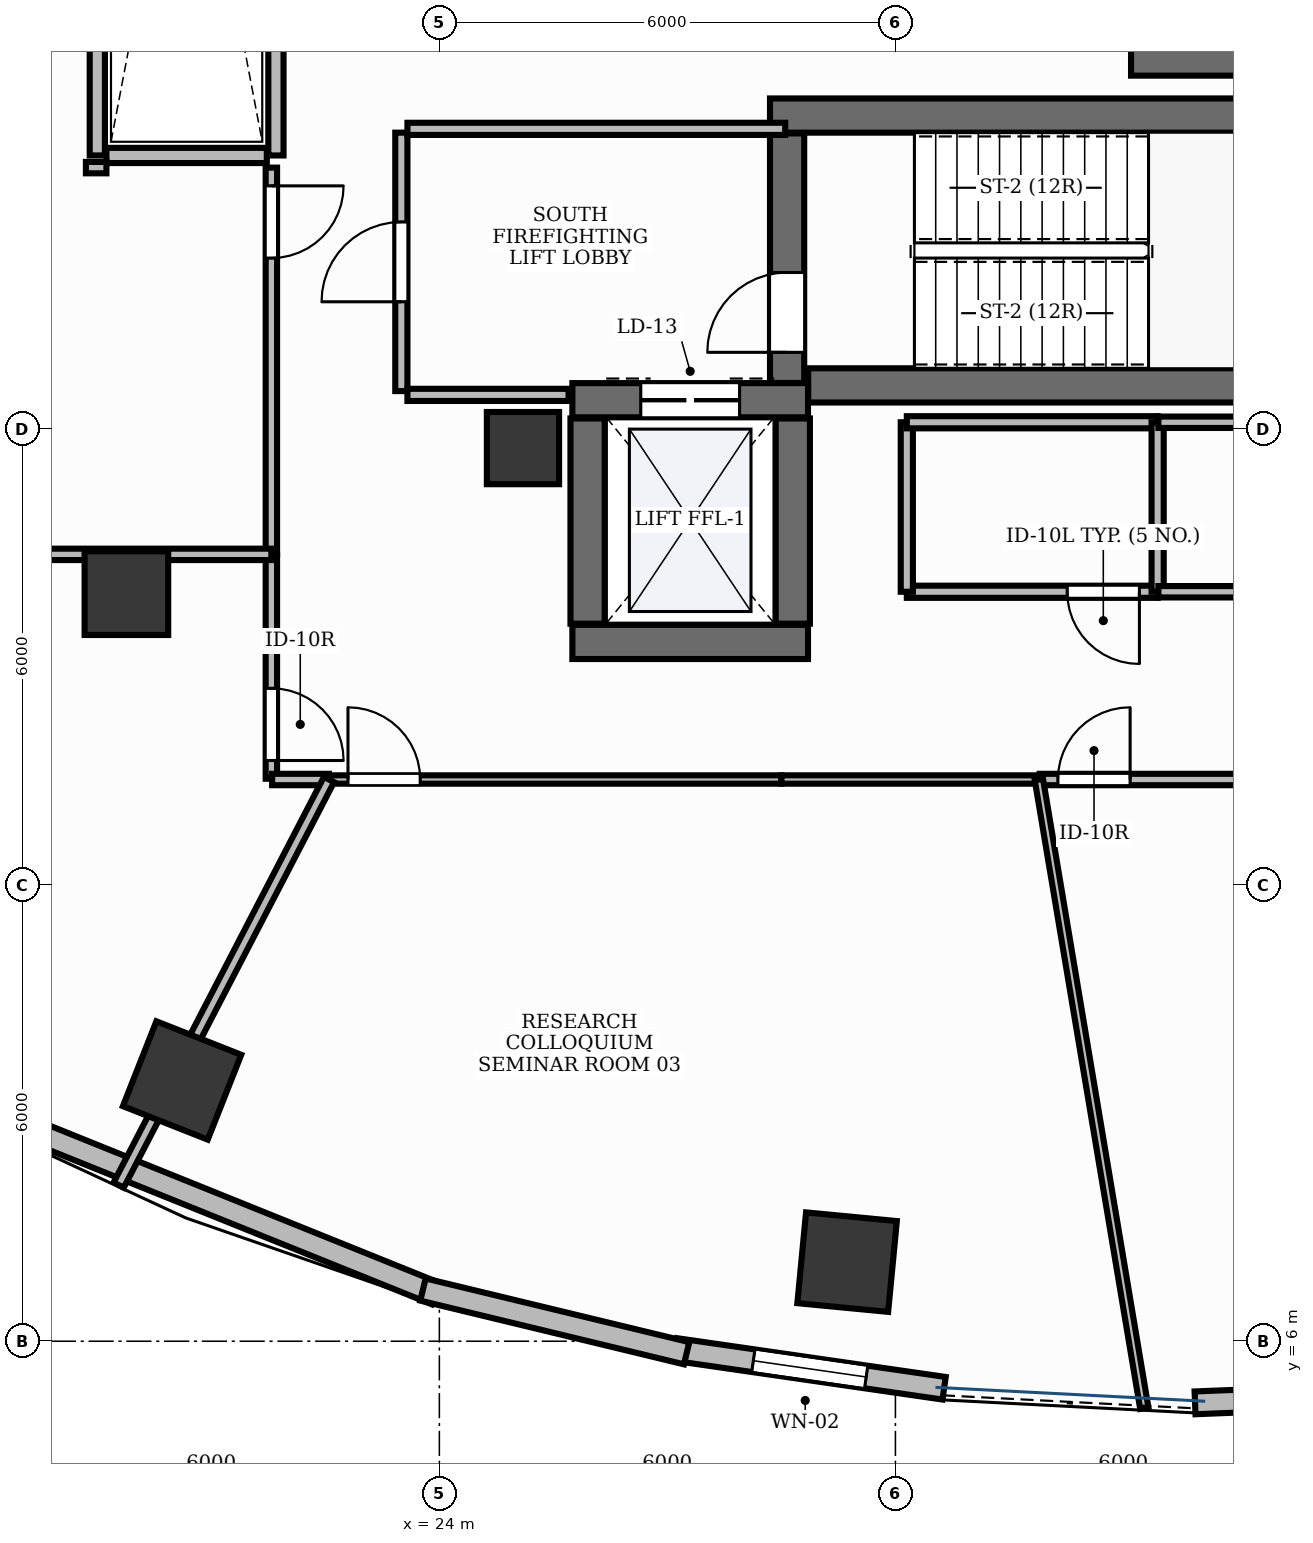
"""IFC4 building model, lengths in metres.
Left out: names, types, materials, properties, quantities, classifications, styles, units other than length and angle.
Written with IfcOpenShell. Run it as: python <this file> out.ifc"""

import sys

from ifc_helpers import new_model, si_unit, direction, frame, frame_2d, origin, origin_2d, place, context, subcontext, project, spatial, rectangle, extrude, element, fill, save


model = new_model("IFC4")
c1 = context("Model", 3, precision=1e-05, world=origin(), true_north=direction((0.0, 1.0)))
c2 = subcontext(c1, "Body", "Model", "MODEL_VIEW")
j1 = project(units=[si_unit("LENGTHUNIT", "METRE"), si_unit("PLANEANGLEUNIT", "RADIAN")], contexts=[c1])
p1 = place(None, origin())
s1 = spatial("IfcSite", under=j1, at=p1, CompositionType="ELEMENT")
p2 = place(p1, origin())
s2 = spatial("IfcBuilding", under=s1, at=p2, CompositionType="ELEMENT")
p3 = place(p2, frame((0.0, 0.0, 132.0)))
s3 = spatial("IfcBuildingStorey", under=s2, at=p3, CompositionType="ELEMENT", Elevation=132.0)
p4 = place(p3, frame((28.852, 18.575, 0.0), z_axis=(0.0, 0.0, 1.0), x_axis=(1.0, 0.0, 0.0)))
e1 = element("IfcWall", 1, at=p4, inside=s3, PredefinedType="SHEAR", context=c2, shape_type="SweptSolid", body=[
    extrude(rectangle(XDim=8.248, YDim=0.45, at=frame_2d((4.124, 0.0))), origin(), (0.0, 0.0, 1.0), 3.9),
])
p5 = place(p3, frame((28.35, 22.125, 0.0), z_axis=(0.0, 0.0, 1.0), x_axis=(1.0, 0.0, 0.0)))
e2 = element("IfcWall", 2, at=p5, inside=s3, PredefinedType="SHEAR", context=c2, shape_type="SweptSolid", body=[
    extrude(rectangle(XDim=8.75, YDim=0.45, at=frame_2d((4.375, 0.0))), origin(), (0.0, 0.0, 1.0), 3.9),
])
p6 = place(p3, frame((28.575, 18.607, 0.0), z_axis=(0.0, 0.0, 1.0), x_axis=(0.0, 1.0, 0.0)))
e3 = element("IfcWall", 3, at=p6, inside=s3, PredefinedType="SHEAR", context=c2, shape_type="SweptSolid", body=[
    extrude(rectangle(XDim=3.283, YDim=0.45, at=frame_2d((1.642, 0.0))), origin(), (0.0, 0.0, 1.0), 3.9),
])
p7 = place(p6, frame((0.403, 0.0, 0.0)))
e4 = element("IfcOpeningElement", 4, at=p7, cuts=e3, PredefinedType="OPENING", context=c2, shape_type="SweptSolid", body=[
    extrude(rectangle(XDim=1.05, YDim=2.15, at=frame_2d((0.525, 1.075))), frame((0.0, 0.24, 0.0), z_axis=(0.0, -1.0, 0.0), x_axis=(1.0, 0.0, 0.0)), (0.0, 0.0, 1.0), 0.48),
])
p8 = place(p3, frame((33.1, 22.875, 0.0), z_axis=(0.0, 0.0, 1.0), x_axis=(1.0, 0.0, 0.0)))
e5 = element("IfcWall", 5, at=p8, inside=s3, PredefinedType="SHEAR", context=c2, shape_type="SweptSolid", body=[
    extrude(rectangle(XDim=4.0, YDim=0.45, at=frame_2d((2.0, 0.0))), origin(), (0.0, 0.0, 1.0), 3.9),
])
p9 = place(p3, frame((25.75, 15.2, 0.0), z_axis=(0.0, 0.0, 1.0), x_axis=(1.0, 0.0, 0.0)))
e6 = element("IfcWall", 6, at=p9, inside=s3, PredefinedType="SHEAR", context=c2, shape_type="SweptSolid", body=[
    extrude(rectangle(XDim=3.1, YDim=0.45, at=frame_2d((1.55, 0.0))), origin(), (0.0, 0.0, 1.0), 3.9),
])
p10 = place(p3, frame((25.75, 18.38, 0.0), z_axis=(0.0, 0.0, 1.0), x_axis=(1.0, 0.0, 0.0)))
e7 = element("IfcWall", 7, at=p10, inside=s3, PredefinedType="SHEAR", context=c2, shape_type="SweptSolid", body=[
    extrude(rectangle(XDim=3.1, YDim=0.45, at=frame_2d((1.55, 0.0))), origin(), (0.0, 0.0, 1.0), 3.9),
])
p11 = place(p10, frame((0.9, 0.0, 0.0)))
e8 = element("IfcOpeningElement", 8, at=p11, cuts=e7, PredefinedType="OPENING", context=c2, shape_type="SweptSolid", body=[
    extrude(rectangle(XDim=1.3, YDim=2.2, at=frame_2d((0.65, 1.1))), frame((0.0, 0.24, 0.0), z_axis=(0.0, -1.0, 0.0), x_axis=(1.0, 0.0, 0.0)), (0.0, 0.0, 1.0), 0.48),
])
for number, where, z_axis, x_axis in (
    (9, (25.95, 15.44, 0.0), (0.0, 0.0, 1.0), (0.0, 1.0, 0.0)),
    (10, (28.65, 15.44, 0.0), (0.0, 0.0, 1.0), (0.0, 1.0, 0.0)),
):
    element("IfcWall", number, at=place(p3, frame(where, z_axis=z_axis, x_axis=x_axis)), inside=s3, PredefinedType="SHEAR", context=c2, shape_type="SweptSolid", body=[
        extrude(rectangle(XDim=2.7, YDim=0.45, at=frame_2d((1.35, 0.0))), origin(), (0.0, 0.0, 1.0), 3.9),
    ])
p12 = place(p3, frame((25.1, 17.75, -0.0), z_axis=(0.0, 0.0, 1.0), x_axis=(1.0, 0.0, 0.0)))
e11 = element("IfcColumn", 11, at=p12, inside=s3, PredefinedType="PILASTER", context=c2, shape_type="SweptSolid", body=[
    extrude(rectangle(XDim=0.95, YDim=0.95, at=origin_2d()), origin(), (0.0, 0.0, 1.0), 3.901),
])
p13 = place(p3, frame((19.883, 15.841, -0.0), z_axis=(0.0, 0.0, 1.0), x_axis=(1.0, 0.0, 0.0)))
e12 = element("IfcColumn", 12, at=p13, inside=s3, PredefinedType="COLUMN", context=c2, shape_type="SweptSolid", body=[
    extrude(rectangle(XDim=1.1, YDim=1.1, at=origin_2d()), origin(), (0.0, 0.0, 1.0), 3.901),
])
for number, where, z_axis, x_axis in (
    (13, (20.615, 9.431, -0.0), (0.0, 0.0, 1.0), (-0.93, 0.367, 0.0)),
    (14, (29.364, 7.041, -0.0), (0.0, 0.0, 1.0), (-0.995, 0.095, 0.0)),
):
    element("IfcColumn", number, at=place(p3, frame(where, z_axis=z_axis, x_axis=x_axis)), inside=s3, PredefinedType="COLUMN", context=c2, shape_type="SweptSolid", body=[
        extrude(rectangle(XDim=1.2, YDim=1.2, at=origin_2d()), origin(), (0.0, 0.0, 1.0), 3.901),
    ])
p14 = place(p3, frame((27.106, 5.892, 0.0), z_axis=(0.0, 0.0, 1.0), x_axis=(0.989740605239, -0.142875940389, 0.0)))
e15 = element("IfcWall", 15, at=p14, inside=s3, PredefinedType="STANDARD", context=c2, shape_type="SweptSolid", body=[
    extrude(rectangle(XDim=3.571, YDim=0.3, at=frame_2d((1.786, 0.0))), origin(), (0.0, 0.0, 1.0), 3.9),
])
p15 = place(p14, frame((1.036, 0.0, 0.95)))
e16 = element("IfcOpeningElement", 16, at=p15, cuts=e15, PredefinedType="OPENING", context=c2, shape_type="SweptSolid", body=[
    extrude(rectangle(XDim=1.5, YDim=1.8, at=frame_2d((0.75, 0.9))), frame((0.0, 0.165, 0.0), z_axis=(0.0, -1.0, 0.0), x_axis=(1.0, 0.0, 0.0)), (0.0, 0.0, 1.0), 0.33),
])
p16 = place(p3, frame((17.678, 9.157, 0.0), z_axis=(0.0, 0.0, 1.0), x_axis=(0.927423312416, -0.374013368194, 0.0)))
e17 = element("IfcWall", 17, at=p16, inside=s3, PredefinedType="STANDARD", context=c2, shape_type="SweptSolid", body=[
    extrude(rectangle(XDim=6.769, YDim=0.3, at=frame_2d((3.385, 0.0))), origin(), (0.0, 0.0, 1.0), 3.47),
])
p17 = place(p3, frame((23.784, 6.68, 0.0), z_axis=(0.0, 0.0, 1.0), x_axis=(0.972043452321, -0.234801036625, 0.0)))
e18 = element("IfcWall", 18, at=p17, inside=s3, PredefinedType="STANDARD", context=c2, shape_type="SweptSolid", body=[
    extrude(rectangle(XDim=3.569, YDim=0.3, at=frame_2d((1.784, 0.0))), origin(), (0.0, 0.0, 1.0), 3.9),
])
p18 = place(p3, frame((33.942, 5.189, 0.0), z_axis=(0.0, 0.0, 1.0), x_axis=(0.999212076676, 0.039689114679, 0.0)))
e19 = element("IfcWall", 19, at=p18, inside=s3, PredefinedType="STANDARD", context=c2, shape_type="SweptSolid", body=[
    extrude(rectangle(XDim=3.635, YDim=0.3, at=frame_2d((1.818, 0.0))), origin(), (0.0, 0.0, 1.0), 3.9),
])
for number, where, z_axis, x_axis in (
    (20, (19.5, 21.6, 0.0), (0.0, 0.0, 1.0), (0.0, 1.0, 0.0)),
    (21, (21.85, 21.6, 0.0), (0.0, 0.0, 1.0), (0.0, 1.0, 0.0)),
):
    element("IfcWall", number, at=place(p3, frame(where, z_axis=z_axis, x_axis=x_axis)), inside=s3, PredefinedType="PARTITIONING", context=c2, shape_type="SweptSolid", body=[
        extrude(rectangle(XDim=10.8, YDim=0.2, at=frame_2d((5.4, 0.0))), origin(), (0.0, 0.0, 1.0), 2.91),
    ])
p19 = place(p3, frame((19.62, 21.6, 0.0), z_axis=(0.0, 0.0, 1.0), x_axis=(1.0, 0.0, 0.0)))
e22 = element("IfcWall", 22, at=p19, inside=s3, PredefinedType="PARTITIONING", context=c2, shape_type="SweptSolid", body=[
    extrude(rectangle(XDim=2.11, YDim=0.2, at=frame_2d((1.055, 0.0))), origin(), (0.0, 0.0, 1.0), 2.91),
])
p20 = place(p3, frame((23.5, 18.5, 0.0), z_axis=(0.0, 0.0, 1.0), x_axis=(0.0, 1.0, 0.0)))
e23 = element("IfcWall", 23, at=p20, inside=s3, PredefinedType="PARTITIONING", context=c2, shape_type="SweptSolid", body=[
    extrude(rectangle(XDim=3.4, YDim=0.16, at=frame_2d((1.7, 0.0))), origin(), (0.0, 0.0, 1.0), 2.91),
])
p21 = place(p20, frame((1.175, 0.0, 0.0)))
e24 = element("IfcOpeningElement", 24, at=p21, cuts=e23, PredefinedType="OPENING", context=c2, shape_type="SweptSolid", body=[
    extrude(rectangle(XDim=1.05, YDim=2.15, at=frame_2d((0.525, 1.075))), frame((0.0, 0.095, 0.0), z_axis=(0.0, -1.0, 0.0), x_axis=(1.0, 0.0, 0.0)), (0.0, 0.0, 1.0), 0.19),
])
p22 = place(p3, frame((23.58, 21.95, 0.0), z_axis=(0.0, 0.0, 1.0), x_axis=(1.0, 0.0, 0.0)))
e25 = element("IfcWall", 25, at=p22, inside=s3, PredefinedType="PARTITIONING", context=c2, shape_type="SweptSolid", body=[
    extrude(rectangle(XDim=4.97, YDim=0.16, at=frame_2d((2.485, 0.0))), origin(), (0.0, 0.0, 1.0), 2.91),
])
p23 = place(p3, frame((23.58, 18.45, 0.0), z_axis=(0.0, 0.0, 1.0), x_axis=(1.0, 0.0, 0.0)))
e26 = element("IfcWall", 26, at=p23, inside=s3, PredefinedType="PARTITIONING", context=c2, shape_type="SweptSolid", body=[
    extrude(rectangle(XDim=2.12, YDim=0.16, at=frame_2d((1.06, 0.0))), origin(), (0.0, 0.0, 1.0), 2.91),
])
p24 = place(p3, frame((33.45, 15.86, 0.0), z_axis=(0.0, 0.0, 1.0), x_axis=(-1.0, 0.0, 0.0)))
e27 = element("IfcWall", 27, at=p24, inside=s3, PredefinedType="PARTITIONING", context=c2, shape_type="SweptSolid", body=[
    extrude(rectangle(XDim=3.3, YDim=0.16, at=frame_2d((1.65, 0.0))), origin(), (0.0, 0.0, 1.0), 2.91),
])
p25 = place(p24, frame((0.24, 0.0, 0.0)))
e28 = element("IfcOpeningElement", 28, at=p25, cuts=e27, PredefinedType="OPENING", context=c2, shape_type="SweptSolid", body=[
    extrude(rectangle(XDim=0.95, YDim=2.15, at=frame_2d((0.475, 1.075))), frame((0.0, 0.095, 0.0), z_axis=(0.0, -1.0, 0.0), x_axis=(1.0, 0.0, 0.0)), (0.0, 0.0, 1.0), 0.19),
])
p26 = place(p3, frame((21.79, 21.44, 0.0), z_axis=(0.0, 0.0, 1.0), x_axis=(0.0, -1.0, 0.0)))
e29 = element("IfcWall", 29, at=p26, inside=s3, PredefinedType="PARTITIONING", context=c2, shape_type="SweptSolid", body=[
    extrude(rectangle(XDim=5.088, YDim=0.15, at=frame_2d((2.544, 0.0))), origin(), (0.0, 0.0, 1.0), 2.91),
])
p27 = place(p26, frame((0.24, 0.0, 0.0)))
e30 = element("IfcOpeningElement", 30, at=p27, cuts=e29, PredefinedType="OPENING", context=c2, shape_type="SweptSolid", body=[
    extrude(rectangle(XDim=0.95, YDim=2.15, at=frame_2d((0.475, 1.075))), frame((0.0, 0.09, 0.0), z_axis=(0.0, -1.0, 0.0), x_axis=(1.0, 0.0, 0.0)), (0.0, 0.0, 1.0), 0.18),
])
p28 = place(p3, frame((21.79, 16.342, 0.0), z_axis=(0.0, 0.0, 1.0), x_axis=(0.0, -1.0, 0.0)))
e31 = element("IfcWall", 31, at=p28, inside=s3, PredefinedType="PARTITIONING", context=c2, shape_type="SweptSolid", body=[
    extrude(rectangle(XDim=2.942, YDim=0.15, at=frame_2d((1.471, 0.0))), origin(), (0.0, 0.0, 1.0), 2.91),
])
p29 = place(p28, frame((1.752, 0.0, 0.0)))
e32 = element("IfcOpeningElement", 32, at=p29, cuts=e31, PredefinedType="OPENING", context=c2, shape_type="SweptSolid", body=[
    extrude(rectangle(XDim=0.95, YDim=2.15, at=frame_2d((0.475, 1.075))), frame((0.0, 0.09, 0.0), z_axis=(0.0, -1.0, 0.0), x_axis=(1.0, 0.0, 0.0)), (0.0, 0.0, 1.0), 0.18),
])
p30 = place(p3, frame((22.558, 13.39, 0.0), z_axis=(0.0, 0.0, 1.0), x_axis=(1.0, 0.0, 0.0)))
e33 = element("IfcWall", 33, at=p30, inside=s3, PredefinedType="MOVABLE", context=c2, shape_type="SweptSolid", body=[
    extrude(rectangle(XDim=5.942, YDim=0.11, at=frame_2d((2.971, 0.0))), origin(), (0.0, 0.0, 1.0), 2.91),
])
p31 = place(p30, frame((0.24, 0.0, 0.0)))
e34 = element("IfcOpeningElement", 34, at=p31, cuts=e33, PredefinedType="OPENING", context=c2, shape_type="SweptSolid", body=[
    extrude(rectangle(XDim=0.95, YDim=2.15, at=frame_2d((0.475, 1.075))), frame((0.0, 0.07, 0.0), z_axis=(0.0, -1.0, 0.0), x_axis=(1.0, 0.0, 0.0)), (0.0, 0.0, 1.0), 0.14),
])
p32 = place(p3, frame((31.898, 13.39, 0.0), z_axis=(0.0, 0.0, 1.0), x_axis=(1.0, 0.0, 0.0)))
e35 = element("IfcWall", 35, at=p32, inside=s3, PredefinedType="PARTITIONING", context=c2, shape_type="SweptSolid", body=[
    extrude(rectangle(XDim=3.702, YDim=0.15, at=frame_2d((1.851, 0.0))), origin(), (0.0, 0.0, 1.0), 2.91),
])
p33 = place(p32, frame((0.24, 0.0, 0.0)))
e36 = element("IfcOpeningElement", 36, at=p33, cuts=e35, PredefinedType="OPENING", context=c2, shape_type="SweptSolid", body=[
    extrude(rectangle(XDim=0.95, YDim=2.15, at=frame_2d((0.475, 1.075))), frame((0.0, 0.09, 0.0), z_axis=(0.0, -1.0, 0.0), x_axis=(1.0, 0.0, 0.0)), (0.0, 0.0, 1.0), 0.18),
])
p34 = place(p3, frame((30.15, 15.86, 0.0), z_axis=(0.0, 0.0, 1.0), x_axis=(0.0, 1.0, 0.0)))
e37 = element("IfcWall", 37, at=p34, inside=s3, PredefinedType="PARTITIONING", context=c2, shape_type="SweptSolid", body=[
    extrude(rectangle(XDim=2.23, YDim=0.16, at=frame_2d((1.115, 0.0))), origin(), (0.0, 0.0, 1.0), 2.91),
])
p35 = place(p3, frame((30.15, 18.09, 0.0), z_axis=(0.0, 0.0, 1.0), x_axis=(1.0, 0.0, 0.0)))
e38 = element("IfcWall", 38, at=p35, inside=s3, PredefinedType="PARTITIONING", context=c2, shape_type="SweptSolid", body=[
    extrude(rectangle(XDim=3.3, YDim=0.16, at=frame_2d((1.65, 0.0))), origin(), (0.0, 0.0, 1.0), 2.91),
])
p36 = place(p3, frame((33.45, 18.09, 0.0), z_axis=(0.0, 0.0, 1.0), x_axis=(0.0, -1.0, 0.0)))
e39 = element("IfcWall", 39, at=p36, inside=s3, PredefinedType="PARTITIONING", context=c2, shape_type="SweptSolid", body=[
    extrude(rectangle(XDim=2.23, YDim=0.16, at=frame_2d((1.115, 0.0))), origin(), (0.0, 0.0, 1.0), 2.91),
])
p37 = place(p3, frame((19.35, 21.44, 0.0), z_axis=(0.0, 0.0, 1.0), x_axis=(1.0, 0.0, 0.0)))
e40 = element("IfcWall", 40, at=p37, inside=s3, PredefinedType="PARTITIONING", context=c2, shape_type="SweptSolid", body=[
    extrude(rectangle(XDim=0.27, YDim=0.15, at=frame_2d((0.135, 0.0))), origin(), (0.0, 0.0, 1.0), 2.91),
])
p38 = place(p3, frame((21.79, 16.352, 0.0), z_axis=(0.0, 0.0, 1.0), x_axis=(-1.0, 0.0, 0.0)))
e41 = element("IfcWall", 41, at=p38, inside=s3, PredefinedType="PARTITIONING", context=c2, shape_type="SweptSolid", body=[
    extrude(rectangle(XDim=9.243, YDim=0.15, at=frame_2d((4.622, 0.0))), origin(), (0.0, 0.0, 1.0), 2.91),
])
p39 = place(p3, frame((21.8, 13.39, 0.0), z_axis=(0.0, 0.0, 1.0), x_axis=(1.0, 0.0, 0.0)))
e42 = element("IfcWall", 42, at=p39, inside=s3, PredefinedType="PARTITIONING", context=c2, shape_type="SweptSolid", body=[
    extrude(rectangle(XDim=0.748, YDim=0.15, at=frame_2d((0.374, 0.0))), origin(), (0.0, 0.0, 1.0), 2.91),
])
p40 = place(p3, frame((22.548, 13.39, 0.0), z_axis=(0.0, 0.0, 1.0), x_axis=(-0.460357473993, -0.887733629046, 0.0)))
e43 = element("IfcWall", 43, at=p40, inside=s3, PredefinedType="PARTITIONING", context=c2, shape_type="SweptSolid", body=[
    extrude(rectangle(XDim=6.011, YDim=0.15, at=frame_2d((3.005, 0.0))), origin(), (0.0, 0.0, 1.0), 2.91),
])
p41 = place(p3, frame((28.5, 13.39, 0.0), z_axis=(0.0, 0.0, 1.0), x_axis=(1.0, 0.0, 0.0)))
e44 = element("IfcWall", 44, at=p41, inside=s3, PredefinedType="MOVABLE", context=c2, shape_type="SweptSolid", body=[
    extrude(rectangle(XDim=3.388, YDim=0.11, at=frame_2d((1.694, 0.0))), origin(), (0.0, 0.0, 1.0), 2.91),
])
p42 = place(p3, frame((31.888, 13.39, 0.0), z_axis=(0.0, 0.0, 1.0), x_axis=(0.165361828892, -0.986232967176, 0.0)))
e45 = element("IfcWall", 45, at=p42, inside=s3, PredefinedType="MOVABLE", context=c2, shape_type="SweptSolid", body=[
    extrude(rectangle(XDim=8.387, YDim=0.11, at=frame_2d((4.194, 0.0))), origin(), (0.0, 0.0, 1.0), 2.91),
])
p43 = place(p3, frame((36.4, 15.86, 0.0), z_axis=(0.0, 0.0, 1.0), x_axis=(-1.0, 0.0, 0.0)))
e46 = element("IfcWall", 46, at=p43, inside=s3, PredefinedType="PARTITIONING", context=c2, shape_type="SweptSolid", body=[
    extrude(rectangle(XDim=2.94, YDim=0.15, at=frame_2d((1.47, 0.0))), origin(), (0.0, 0.0, 1.0), 2.91),
])
p44 = place(p3, frame((33.46, 18.09, 0.0), z_axis=(0.0, 0.0, 1.0), x_axis=(1.0, 0.0, 0.0)))
e47 = element("IfcWall", 47, at=p44, inside=s3, PredefinedType="PARTITIONING", context=c2, shape_type="SweptSolid", body=[
    extrude(rectangle(XDim=3.89, YDim=0.15, at=frame_2d((1.945, 0.0))), origin(), (0.0, 0.0, 1.0), 2.91),
])
p45 = place(p15, origin())
e48 = element("IfcWindow", 48, at=p45, inside=s3, PartitioningType="DOUBLE_PANEL_VERTICAL", PredefinedType="WINDOW", context=c2, shape_type="SweptSolid", body=[
    extrude(rectangle(XDim=1.5, YDim=1.8, at=frame_2d((0.75, 0.9))), frame((0.0, 0.03, 0.0), z_axis=(0.0, -1.0, 0.0), x_axis=(1.0, 0.0, 0.0)), (0.0, 0.0, 1.0), 0.06),
])
fill(e16, e48)
p46 = place(p7, origin())
e49 = element("IfcDoor", 49, at=p46, inside=s3, OperationType="SINGLE_SWING_LEFT", PredefinedType="DOOR", context=c2, shape_type="SweptSolid", body=[
    extrude(rectangle(XDim=1.05, YDim=2.15, at=frame_2d((0.525, 1.075))), frame((0.0, 0.025, 0.0), z_axis=(0.0, -1.0, 0.0), x_axis=(1.0, 0.0, 0.0)), (0.0, 0.0, 1.0), 0.05),
])
fill(e4, e49)
p47 = place(p11, origin())
e50 = element("IfcDoor", 50, at=p47, inside=s3, OperationType="DOUBLE_DOOR_SLIDING", PredefinedType="DOOR", context=c2, shape_type="SweptSolid", body=[
    extrude(rectangle(XDim=1.3, YDim=2.2, at=frame_2d((0.65, 1.1))), frame((0.0, 0.025, 0.0), z_axis=(0.0, -1.0, 0.0), x_axis=(1.0, 0.0, 0.0)), (0.0, 0.0, 1.0), 0.05),
])
fill(e8, e50)
p48 = place(p21, origin())
e51 = element("IfcDoor", 51, at=p48, inside=s3, OperationType="SINGLE_SWING_LEFT", PredefinedType="DOOR", context=c2, shape_type="SweptSolid", body=[
    extrude(rectangle(XDim=1.05, YDim=2.15, at=frame_2d((0.525, 1.075))), frame((0.0, 0.025, 0.0), z_axis=(0.0, -1.0, 0.0), x_axis=(1.0, 0.0, 0.0)), (0.0, 0.0, 1.0), 0.05),
])
fill(e24, e51)
p49 = place(p25, origin())
e52 = element("IfcDoor", 52, at=p49, inside=s3, OperationType="SINGLE_SWING_LEFT", PredefinedType="DOOR", context=c2, shape_type="SweptSolid", body=[
    extrude(rectangle(XDim=0.95, YDim=2.15, at=frame_2d((0.475, 1.075))), frame((0.0, 0.025, 0.0), z_axis=(0.0, -1.0, 0.0), x_axis=(1.0, 0.0, 0.0)), (0.0, 0.0, 1.0), 0.05),
])
fill(e28, e52)
p50 = place(p27, origin())
e53 = element("IfcDoor", 53, at=p50, inside=s3, OperationType="SINGLE_SWING_LEFT", PredefinedType="DOOR", context=c2, shape_type="SweptSolid", body=[
    extrude(rectangle(XDim=0.95, YDim=2.15, at=frame_2d((0.475, 1.075))), frame((0.0, 0.025, 0.0), z_axis=(0.0, -1.0, 0.0), x_axis=(1.0, 0.0, 0.0)), (0.0, 0.0, 1.0), 0.05),
])
fill(e30, e53)
p51 = place(p29, origin())
e54 = element("IfcDoor", 54, at=p51, inside=s3, OperationType="SINGLE_SWING_RIGHT", PredefinedType="DOOR", context=c2, shape_type="SweptSolid", body=[
    extrude(rectangle(XDim=0.95, YDim=2.15, at=frame_2d((0.475, 1.075))), frame((0.0, 0.025, 0.0), z_axis=(0.0, -1.0, 0.0), x_axis=(1.0, 0.0, 0.0)), (0.0, 0.0, 1.0), 0.05),
])
fill(e32, e54)
p52 = place(p31, origin())
e55 = element("IfcDoor", 55, at=p52, inside=s3, OperationType="SINGLE_SWING_LEFT", PredefinedType="DOOR", context=c2, shape_type="SweptSolid", body=[
    extrude(rectangle(XDim=0.95, YDim=2.15, at=frame_2d((0.475, 1.075))), frame((0.0, 0.025, 0.0), z_axis=(0.0, -1.0, 0.0), x_axis=(1.0, 0.0, 0.0)), (0.0, 0.0, 1.0), 0.05),
])
fill(e34, e55)
p53 = place(p33, origin())
e56 = element("IfcDoor", 56, at=p53, inside=s3, OperationType="SINGLE_SWING_RIGHT", PredefinedType="DOOR", context=c2, shape_type="SweptSolid", body=[
    extrude(rectangle(XDim=0.95, YDim=2.15, at=frame_2d((0.475, 1.075))), frame((0.0, 0.025, 0.0), z_axis=(0.0, -1.0, 0.0), x_axis=(1.0, 0.0, 0.0)), (0.0, 0.0, 1.0), 0.05),
])
fill(e36, e56)
save(model, sys.argv[1])
